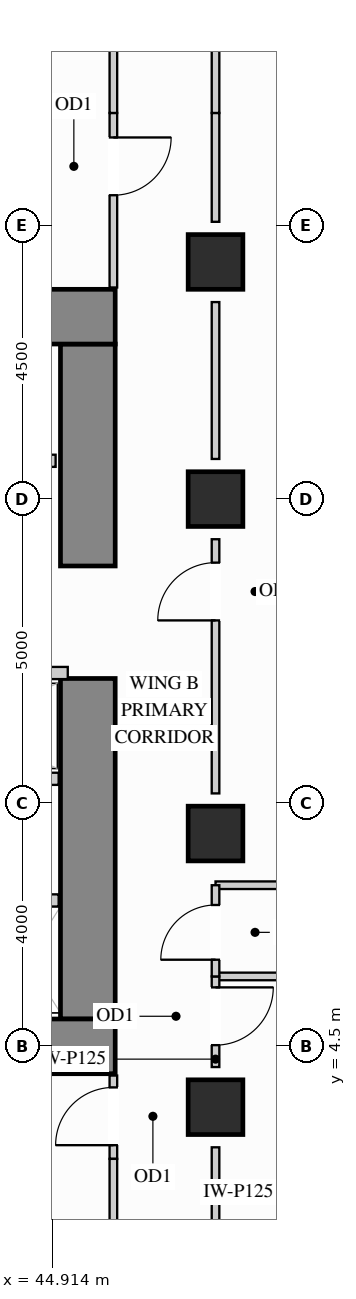
"""IFC4 building model, lengths in metres.
Left out: names, types, materials, properties, quantities, classifications, styles, units other than length and angle.
Written with IfcOpenShell. Run it as: python <this file> out.ifc"""

import sys

from ifc_helpers import new_model, si_unit, direction, frame, frame_2d, origin, origin_2d, place, context, subcontext, project, spatial, rectangle, extrude, source, transform, mapped, element, fill, save


model = new_model("IFC4")
c1 = context("Model", 3, precision=1e-05, world=origin(), true_north=direction((0.0, 1.0)))
c2 = subcontext(c1, "Body", "Model", "MODEL_VIEW")
j1 = project(units=[si_unit("LENGTHUNIT", "METRE"), si_unit("PLANEANGLEUNIT", "RADIAN")], contexts=[c1])
p1 = place(None, origin())
s1 = spatial("IfcSite", under=j1, at=p1, CompositionType="ELEMENT")
p2 = place(p1, origin())
s2 = spatial("IfcBuilding", under=s1, at=p2, CompositionType="ELEMENT")
p3 = place(p2, frame((0.0, 0.0, 44.1)))
s3 = spatial("IfcBuildingStorey", under=s2, at=p3, CompositionType="ELEMENT", Elevation=44.1)
m1 = source(origin(), c2, "Body", "SweptSolid", [
    extrude(rectangle(XDim=0.9, YDim=0.9, at=origin_2d()), origin(), (0.0, 0.0, 1.0), 3.38),
])
for number, where, z_axis, x_axis in (
    (1, (47.6, 13.5, 0.0), (0.0, 0.0, 1.0), (1.0, 0.0, 0.0)),
    (2, (47.6, 3.5, 0.0), (0.0, 0.0, 1.0), (1.0, 0.0, 0.0)),
    (3, (47.6, 8.0, 0.0), (0.0, 0.0, 1.0), (1.0, 0.0, 0.0)),
    (4, (47.6, 17.4, 0.0), (0.0, 0.0, 1.0), (1.0, 0.0, 0.0)),
):
    element("IfcColumn", number, at=place(p3, frame(where, z_axis=z_axis, x_axis=x_axis)), inside=s3, PredefinedType="COLUMN", context=c2, shape_type="MappedRepresentation", body=[
        mapped(m1, transform((0.0, 0.0, 0.0), x_axis=(1.0, 0.0, 0.0), y_axis=(0.0, 1.0, 0.0), z_axis=(0.0, 0.0, 1.0))),
    ])
m2 = source(origin(), c2, "Body", "SweptSolid", [
    extrude(rectangle(XDim=5.6, YDim=0.9, at=frame_2d((2.8, 0.0))), origin(), (0.0, 0.0, 1.0), 3.38),
])
p4 = place(p3, frame((45.5, 4.95, 0.0), z_axis=(0.0, 0.0, 1.0), x_axis=(0.0, 1.0, 0.0)))
e5 = element("IfcWall", 5, at=p4, inside=s3, PredefinedType="SHEAR", context=c2, shape_type="MappedRepresentation", body=[
    mapped(m2, transform((0.0, 0.0, 0.0), x_axis=(1.0, 0.0, 0.0), y_axis=(0.0, 1.0, 0.0), z_axis=(0.0, 0.0, 1.0))),
])
m3 = source(origin(), c2, "Body", "SweptSolid", [
    extrude(rectangle(XDim=3.65, YDim=0.9, at=frame_2d((1.825, 0.0))), origin(), (0.0, 0.0, 1.0), 3.38),
])
p5 = place(p3, frame((45.5, 12.4, 0.0), z_axis=(0.0, 0.0, 1.0), x_axis=(0.0, 1.0, 0.0)))
e6 = element("IfcWall", 6, at=p5, inside=s3, PredefinedType="SHEAR", context=c2, shape_type="MappedRepresentation", body=[
    mapped(m3, transform((0.0, 0.0, 0.0), x_axis=(1.0, 0.0, 0.0), y_axis=(0.0, 1.0, 0.0), z_axis=(0.0, 0.0, 1.0))),
])
m4 = source(origin(), c2, "Body", "SweptSolid", [
    extrude(rectangle(XDim=10.4, YDim=0.9, at=frame_2d((5.2, 0.0))), origin(), (0.0, 0.0, 1.0), 3.38),
])
for number, where, z_axis, x_axis in (
    (7, (35.55, 16.5, 0.0), (0.0, 0.0, 1.0), (1.0, 0.0, 0.0)),
    (8, (35.55, 4.5, 0.0), (0.0, 0.0, 1.0), (1.0, 0.0, 0.0)),
):
    element("IfcWall", number, at=place(p3, frame(where, z_axis=z_axis, x_axis=x_axis)), inside=s3, PredefinedType="SHEAR", context=c2, shape_type="MappedRepresentation", body=[
        mapped(m4, transform((0.0, 0.0, 0.0), x_axis=(1.0, 0.0, 0.0), y_axis=(0.0, 1.0, 0.0), z_axis=(0.0, 0.0, 1.0))),
    ])
m5 = source(origin(), c2, "Body", "SweptSolid", [
    extrude(rectangle(XDim=11.048, YDim=0.125, at=frame_2d((5.524, 0.0))), origin(), (0.0, 0.0, 1.0), 3.365),
])
for number, where, z_axis, x_axis in (
    (9, (47.6, 5.65, 0.0), (0.0, 0.0, 1.0), (1.0, 0.0, 0.0)),
    (10, (47.6, 7.15, 0.0), (0.0, 0.0, 1.0), (1.0, 0.0, 0.0)),
):
    element("IfcWall", number, at=place(p3, frame(where, z_axis=z_axis, x_axis=x_axis)), inside=s3, PredefinedType="PARTITIONING", context=c2, shape_type="MappedRepresentation", body=[
        mapped(m5, transform((0.0, 0.0, 0.0), x_axis=(1.0, 0.0, 0.0), y_axis=(0.0, 1.0, 0.0), z_axis=(0.0, 0.0, 1.0))),
    ])
p6 = place(p3, frame((47.6, 4.16, 0.0), z_axis=(0.0, 0.0, 1.0), x_axis=(0.0, 1.0, 0.0)))
e11 = element("IfcWall", 11, at=p6, inside=s3, PredefinedType="PARTITIONING", context=c2, shape_type="SweptSolid", body=[
    extrude(rectangle(XDim=1.49, YDim=0.125, at=frame_2d((0.745, 0.0))), origin(), (0.0, 0.0, 1.0), 2.67),
])
p7 = place(p6, frame((0.36, 0.0, 0.0)))
e12 = element("IfcOpeningElement", 12, at=p7, cuts=e11, PredefinedType="OPENING", context=c2, shape_type="SweptSolid", body=[
    extrude(rectangle(XDim=0.95, YDim=2.15, at=frame_2d((0.475, 1.075))), frame((0.0, 0.073, 0.0), z_axis=(0.0, -1.0, 0.0), x_axis=(1.0, 0.0, 0.0)), (0.0, 0.0, 1.0), 0.145),
])
m6 = source(origin(), c2, "Body", "SweptSolid", [
    extrude(rectangle(XDim=1.58, YDim=0.125, at=frame_2d((0.79, 0.0))), origin(), (0.0, 0.0, 1.0), 2.67),
])
p8 = place(p3, frame((47.6, 1.26, 0.0), z_axis=(0.0, 0.0, 1.0), x_axis=(0.0, 1.0, 0.0)))
e13 = element("IfcWall", 13, at=p8, inside=s3, PredefinedType="PARTITIONING", context=c2, shape_type="MappedRepresentation", body=[
    mapped(m6, transform((0.0, 0.0, 0.0), x_axis=(1.0, 0.0, 0.0), y_axis=(0.0, 1.0, 0.0), z_axis=(0.0, 0.0, 1.0))),
])
p9 = place(p3, frame((47.6, 8.66, 0.0), z_axis=(0.0, 0.0, 1.0), x_axis=(0.0, 1.0, 0.0)))
e14 = element("IfcWall", 14, at=p9, inside=s3, PredefinedType="PARTITIONING", context=c2, shape_type="SweptSolid", body=[
    extrude(rectangle(XDim=4.18, YDim=0.125, at=frame_2d((2.09, 0.0))), origin(), (0.0, 0.0, 1.0), 2.67),
])
p10 = place(p9, frame((2.845, 0.0, 0.0)))
e15 = element("IfcOpeningElement", 15, at=p10, cuts=e14, PredefinedType="OPENING", context=c2, shape_type="SweptSolid", body=[
    extrude(rectangle(XDim=0.95, YDim=2.15, at=frame_2d((0.475, 1.075))), frame((0.0, 0.073, 0.0), z_axis=(0.0, -1.0, 0.0), x_axis=(1.0, 0.0, 0.0)), (0.0, 0.0, 1.0), 0.145),
])
m7 = source(origin(), c2, "Body", "SweptSolid", [
    extrude(rectangle(XDim=2.58, YDim=0.125, at=frame_2d((1.29, 0.0))), origin(), (0.0, 0.0, 1.0), 2.67),
])
p11 = place(p3, frame((47.6, 14.16, 0.0), z_axis=(0.0, 0.0, 1.0), x_axis=(0.0, 1.0, 0.0)))
e16 = element("IfcWall", 16, at=p11, inside=s3, PredefinedType="PARTITIONING", context=c2, shape_type="MappedRepresentation", body=[
    mapped(m7, transform((0.0, 0.0, 0.0), x_axis=(1.0, 0.0, 0.0), y_axis=(0.0, 1.0, 0.0), z_axis=(0.0, 0.0, 1.0))),
])
m8 = source(origin(), c2, "Body", "SweptSolid", [
    extrude(rectangle(XDim=1.79, YDim=0.125, at=frame_2d((0.895, 0.0))), origin(), (0.0, 0.0, 1.0), 2.67),
])
p12 = place(p3, frame((47.6, 18.06, 0.0), z_axis=(0.0, 0.0, 1.0), x_axis=(0.0, 1.0, 0.0)))
e17 = element("IfcWall", 17, at=p12, inside=s3, PredefinedType="PARTITIONING", context=c2, shape_type="MappedRepresentation", body=[
    mapped(m8, transform((0.0, 0.0, 0.0), x_axis=(1.0, 0.0, 0.0), y_axis=(0.0, 1.0, 0.0), z_axis=(0.0, 0.0, 1.0))),
])
m9 = source(origin(), c2, "Body", "SweptSolid", [
    extrude(rectangle(XDim=1.39, YDim=0.125, at=frame_2d((0.695, 0.0))), origin(), (0.0, 0.0, 1.0), 2.67),
])
p13 = place(p3, frame((47.6, 19.85, 0.0), z_axis=(0.0, 0.0, 1.0), x_axis=(0.0, 1.0, 0.0)))
e18 = element("IfcWall", 18, at=p13, inside=s3, PredefinedType="PARTITIONING", context=c2, shape_type="MappedRepresentation", body=[
    mapped(m9, transform((0.0, 0.0, 0.0), x_axis=(1.0, 0.0, 0.0), y_axis=(0.0, 1.0, 0.0), z_axis=(0.0, 0.0, 1.0))),
])
p14 = place(p3, frame((47.6, 5.65, 0.0), z_axis=(0.0, 0.0, 1.0), x_axis=(0.0, 1.0, 0.0)))
e19 = element("IfcWall", 19, at=p14, inside=s3, PredefinedType="PARTITIONING", context=c2, shape_type="SweptSolid", body=[
    extrude(rectangle(XDim=1.5, YDim=0.125, at=frame_2d((0.75, 0.0))), origin(), (0.0, 0.0, 1.0), 2.67),
])
p15 = place(p14, frame((0.275, 0.0, 0.0)))
e20 = element("IfcOpeningElement", 20, at=p15, cuts=e19, PredefinedType="OPENING", context=c2, shape_type="SweptSolid", body=[
    extrude(rectangle(XDim=0.9, YDim=2.15, at=frame_2d((0.45, 1.075))), frame((0.0, 0.073, 0.0), z_axis=(0.0, -1.0, 0.0), x_axis=(1.0, 0.0, 0.0)), (0.0, 0.0, 1.0), 0.145),
])
p16 = place(p3, frame((45.92, 16.98, 0.0), z_axis=(0.0, 0.0, 1.0), x_axis=(0.0, 1.0, 0.0)))
e21 = element("IfcWall", 21, at=p16, inside=s3, PredefinedType="PARTITIONING", context=c2, shape_type="SweptSolid", body=[
    extrude(rectangle(XDim=2.87, YDim=0.125, at=frame_2d((1.435, 0.0))), origin(), (0.0, 0.0, 1.0), 3.365),
])
p17 = place(p16, frame((1.517, 0.0, 0.0)))
e22 = element("IfcOpeningElement", 22, at=p17, cuts=e21, PredefinedType="OPENING", context=c2, shape_type="SweptSolid", body=[
    extrude(rectangle(XDim=0.95, YDim=2.15, at=frame_2d((0.475, 1.075))), frame((0.0, 0.073, 0.0), z_axis=(0.0, -1.0, 0.0), x_axis=(1.0, 0.0, 0.0)), (0.0, 0.0, 1.0), 0.145),
])
m10 = source(origin(), c2, "Body", "SweptSolid", [
    extrude(rectangle(XDim=2.298, YDim=0.125, at=frame_2d((1.149, 0.0))), origin(), (0.0, 0.0, 1.0), 3.365),
])
p18 = place(p3, frame((45.92, 19.85, 0.0), z_axis=(0.0, 0.0, 1.0), x_axis=(0.0, 1.0, 0.0)))
e23 = element("IfcWall", 23, at=p18, inside=s3, PredefinedType="PARTITIONING", context=c2, shape_type="MappedRepresentation", body=[
    mapped(m10, transform((0.0, 0.0, 0.0), x_axis=(1.0, 0.0, 0.0), y_axis=(0.0, 1.0, 0.0), z_axis=(0.0, 0.0, 1.0))),
])
p19 = place(p3, frame((45.92, 2.65, 0.0), z_axis=(0.0, 0.0, 1.0), x_axis=(0.0, 1.0, 0.0)))
e24 = element("IfcWall", 24, at=p19, inside=s3, PredefinedType="PARTITIONING", context=c2, shape_type="SweptSolid", body=[
    extrude(rectangle(XDim=1.37, YDim=0.125, at=frame_2d((0.685, 0.0))), origin(), (0.0, 0.0, 1.0), 3.365),
])
p20 = place(p19, frame((0.225, 0.0, 0.0)))
e25 = element("IfcOpeningElement", 25, at=p20, cuts=e24, PredefinedType="OPENING", context=c2, shape_type="SweptSolid", body=[
    extrude(rectangle(XDim=0.95, YDim=2.15, at=frame_2d((0.475, 1.075))), frame((0.0, 0.073, 0.0), z_axis=(0.0, -1.0, 0.0), x_axis=(1.0, 0.0, 0.0)), (0.0, 0.0, 1.0), 0.145),
])
p21 = place(p3, frame((45.92, 0.352, 0.0), z_axis=(0.0, 0.0, 1.0), x_axis=(0.0, 1.0, 0.0)))
e26 = element("IfcWall", 26, at=p21, inside=s3, PredefinedType="PARTITIONING", context=c2, shape_type="MappedRepresentation", body=[
    mapped(m10, transform((0.0, 0.0, 0.0), x_axis=(1.0, 0.0, 0.0), y_axis=(0.0, 1.0, 0.0), z_axis=(0.0, 0.0, 1.0))),
])
m11 = source(origin(), c2, "Body", "SweptSolid", [
    extrude(rectangle(XDim=1.17, YDim=0.2, at=frame_2d((0.585, 0.0))), origin(), (0.0, 0.0, 1.0), 3.365),
])
p22 = place(p3, frame((43.85, 6.9, 0.0), z_axis=(0.0, 0.0, 1.0), x_axis=(1.0, 0.0, 0.0)))
e27 = element("IfcWall", 27, at=p22, inside=s3, PredefinedType="PARTITIONING", context=c2, shape_type="MappedRepresentation", body=[
    mapped(m11, transform((0.0, 0.0, 0.0), x_axis=(1.0, 0.0, 0.0), y_axis=(0.0, 1.0, 0.0), z_axis=(0.0, 0.0, 1.0))),
])
p23 = place(p3, frame((42.23, 14.13, 0.0), z_axis=(0.0, 0.0, 1.0), x_axis=(1.0, 0.0, 0.0)))
e28 = element("IfcWall", 28, at=p23, inside=s3, PredefinedType="PARTITIONING", context=c2, shape_type="SweptSolid", body=[
    extrude(rectangle(XDim=2.74, YDim=0.2, at=frame_2d((1.37, 0.0))), origin(), (0.0, 0.0, 1.0), 3.365),
])
p24 = place(p23, frame((0.82, 0.0, 0.0)))
e29 = element("IfcOpeningElement", 29, at=p24, cuts=e28, PredefinedType="OPENING", context=c2, shape_type="SweptSolid", body=[
    extrude(rectangle(XDim=1.1, YDim=2.2, at=frame_2d((0.55, 1.1))), frame((0.0, 0.11, 0.0), z_axis=(0.0, -1.0, 0.0), x_axis=(1.0, 0.0, 0.0)), (0.0, 0.0, 1.0), 0.22),
])
m12 = source(origin(), c2, "Body", "SweptSolid", [
    extrude(rectangle(XDim=3.49, YDim=0.2, at=frame_2d((1.745, 0.0))), origin(), (0.0, 0.0, 1.0), 3.365),
])
p25 = place(p3, frame((41.68, 10.64, 0.0), z_axis=(0.0, 0.0, 1.0), x_axis=(1.0, 0.0, 0.0)))
e30 = element("IfcWall", 30, at=p25, inside=s3, PredefinedType="PARTITIONING", context=c2, shape_type="MappedRepresentation", body=[
    mapped(m12, transform((0.0, 0.0, 0.0), x_axis=(1.0, 0.0, 0.0), y_axis=(0.0, 1.0, 0.0), z_axis=(0.0, 0.0, 1.0))),
])
m13 = source(origin(), c2, "Body", "SweptSolid", [
    extrude(rectangle(XDim=3.34, YDim=0.2, at=frame_2d((1.67, 0.0))), origin(), (0.0, 0.0, 1.0), 3.365),
])
p26 = place(p3, frame((41.68, 8.9, 0.0), z_axis=(0.0, 0.0, 1.0), x_axis=(1.0, 0.0, 0.0)))
e31 = element("IfcWall", 31, at=p26, inside=s3, PredefinedType="PARTITIONING", context=c2, shape_type="MappedRepresentation", body=[
    mapped(m13, transform((0.0, 0.0, 0.0), x_axis=(1.0, 0.0, 0.0), y_axis=(0.0, 1.0, 0.0), z_axis=(0.0, 0.0, 1.0))),
])
m14 = source(origin(), c2, "Body", "SweptSolid", [
    extrude(rectangle(XDim=0.95, YDim=2.15, at=frame_2d((0.475, 1.075))), frame((0.0, 0.025, 0.0), z_axis=(0.0, -1.0, 0.0), x_axis=(1.0, 0.0, 0.0)), (0.0, 0.0, 1.0), 0.05),
])
p27 = place(p17, origin())
e32 = element("IfcDoor", 32, at=p27, inside=s3, OperationType="SINGLE_SWING_RIGHT", PredefinedType="DOOR", context=c2, shape_type="MappedRepresentation", body=[
    mapped(m14, transform((0.0, 0.0, 0.0), x_axis=(1.0, 0.0, 0.0), y_axis=(0.0, 1.0, 0.0), z_axis=(0.0, 0.0, 1.0))),
])
fill(e22, e32)
p28 = place(p20, origin())
e33 = element("IfcDoor", 33, at=p28, inside=s3, OperationType="SINGLE_SWING_LEFT", PredefinedType="DOOR", context=c2, shape_type="MappedRepresentation", body=[
    mapped(m14, transform((0.0, 0.0, 0.0), x_axis=(1.0, 0.0, 0.0), y_axis=(0.0, 1.0, 0.0), z_axis=(0.0, 0.0, 1.0))),
])
fill(e25, e33)
p29 = place(p7, origin())
e34 = element("IfcDoor", 34, at=p29, inside=s3, OperationType="SINGLE_SWING_RIGHT", PredefinedType="DOOR", context=c2, shape_type="MappedRepresentation", body=[
    mapped(m14, transform((0.0, 0.0, 0.0), x_axis=(1.0, 0.0, 0.0), y_axis=(0.0, 1.0, 0.0), z_axis=(0.0, 0.0, 1.0))),
])
fill(e12, e34)
p30 = place(p10, origin())
e35 = element("IfcDoor", 35, at=p30, inside=s3, OperationType="SINGLE_SWING_LEFT", PredefinedType="DOOR", context=c2, shape_type="MappedRepresentation", body=[
    mapped(m14, transform((0.0, 0.0, 0.0), x_axis=(1.0, 0.0, 0.0), y_axis=(0.0, 1.0, 0.0), z_axis=(0.0, 0.0, 1.0))),
])
fill(e15, e35)
m15 = source(origin(), c2, "Body", "SweptSolid", [
    extrude(rectangle(XDim=0.9, YDim=2.15, at=frame_2d((0.45, 1.075))), frame((0.0, 0.025, 0.0), z_axis=(0.0, -1.0, 0.0), x_axis=(1.0, 0.0, 0.0)), (0.0, 0.0, 1.0), 0.05),
])
p31 = place(p15, origin())
e36 = element("IfcDoor", 36, at=p31, inside=s3, OperationType="SINGLE_SWING_LEFT", PredefinedType="DOOR", context=c2, shape_type="MappedRepresentation", body=[
    mapped(m15, transform((0.0, 0.0, 0.0), x_axis=(1.0, 0.0, 0.0), y_axis=(0.0, 1.0, 0.0), z_axis=(0.0, 0.0, 1.0))),
])
fill(e20, e36)
save(model, sys.argv[1])
